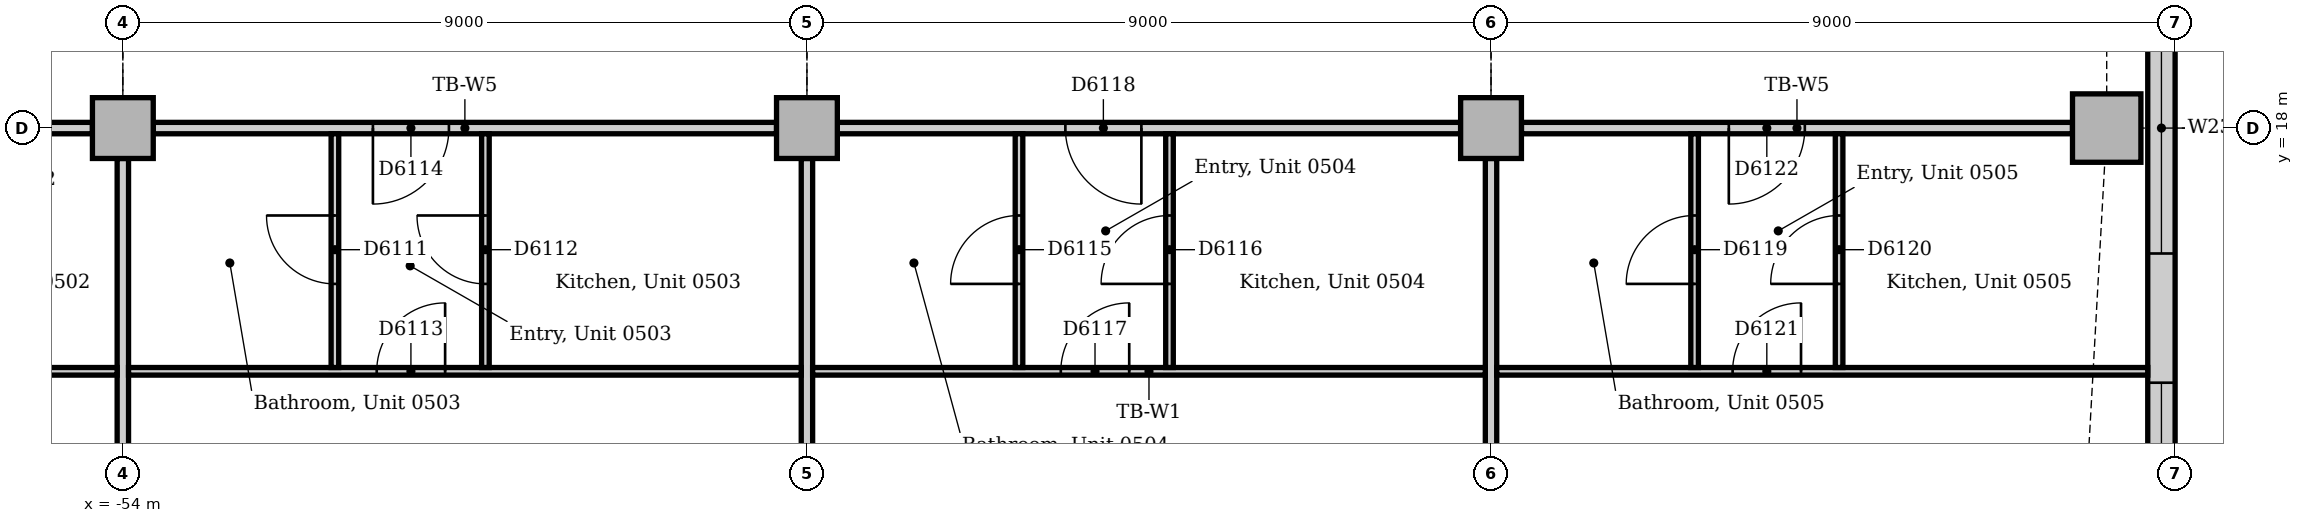
"""IFC4 building model, lengths in metres.
Left out: names, types, materials, properties, quantities, classifications, styles, units other than length and angle.
Written with IfcOpenShell. Run it as: python <this file> out.ifc"""

import sys

from ifc_helpers import new_model, si_unit, direction, frame, frame_2d, origin, origin_2d, place, context, subcontext, project, spatial, rectangle, extrude, element, fill, save


model = new_model("IFC4")
c1 = context("Model", 3, precision=1e-05, world=origin(), true_north=direction((0.0, 1.0)))
c2 = subcontext(c1, "Body", "Model", "MODEL_VIEW")
j1 = project(units=[si_unit("LENGTHUNIT", "METRE"), si_unit("PLANEANGLEUNIT", "RADIAN")], contexts=[c1])
p1 = place(None, origin())
s1 = spatial("IfcSite", under=j1, at=p1, CompositionType="ELEMENT")
p2 = place(p1, origin())
s2 = spatial("IfcBuilding", under=s1, at=p2, CompositionType="ELEMENT")
p3 = place(p2, frame((0.0, 0.0, 26.0)))
s3 = spatial("IfcBuildingStorey", under=s2, at=p3, CompositionType="ELEMENT", Elevation=26.0)
p4 = place(p3, frame((-27.9, 18.0, 0.0), z_axis=(0.0, 0.0, 1.0), x_axis=(1.0, 0.0, 0.0)))
e1 = element("IfcColumn", 1, at=p4, inside=s3, PredefinedType="COLUMN", context=c2, shape_type="SweptSolid", body=[
    extrude(rectangle(XDim=0.9, YDim=0.9, at=origin_2d()), origin(), (0.0, 0.0, 1.0), 3.85),
])
for number, where, z_axis, x_axis in (
    (2, (-54.0, 18.0, 0.0), (0.0, 0.0, 1.0), (1.0, 0.0, 0.0)),
    (3, (-45.0, 18.0, 0.0), (0.0, 0.0, 1.0), (1.0, 0.0, 0.0)),
    (4, (-36.0, 18.0, 0.0), (0.0, 0.0, 1.0), (1.0, 0.0, 0.0)),
):
    element("IfcColumn", number, at=place(p3, frame(where, z_axis=z_axis, x_axis=x_axis)), inside=s3, PredefinedType="COLUMN", context=c2, shape_type="SweptSolid", body=[
        extrude(rectangle(XDim=0.8, YDim=0.8, at=origin_2d()), origin(), (0.0, 0.0, 1.0), 3.85),
    ])
p5 = place(p3, frame((-27.18, 8.743, 0.0), z_axis=(0.0, 0.0, 1.0), x_axis=(0.0, 1.0, 0.0)))
e5 = element("IfcWall", 5, at=p5, inside=s3, PredefinedType="STANDARD", context=c2, shape_type="SweptSolid", body=[
    extrude(rectangle(XDim=12.257, YDim=0.36, at=frame_2d((6.129, 0.0))), origin(), (0.0, 0.0, 1.0), 3.85),
])
p6 = place(p5, frame((2.607, 0.0, 0.9)))
e6 = element("IfcOpeningElement", 6, at=p6, cuts=e5, PredefinedType="OPENING", context=c2, shape_type="SweptSolid", body=[
    extrude(rectangle(XDim=3.3, YDim=1.6, at=frame_2d((1.65, 0.8))), frame((0.0, 0.19, 0.0), z_axis=(0.0, -1.0, 0.0), x_axis=(1.0, 0.0, 0.0)), (0.0, 0.0, 1.0), 0.38),
])
p7 = place(p5, frame((7.607, 0.0, 0.9)))
e7 = element("IfcOpeningElement", 7, at=p7, cuts=e5, PredefinedType="OPENING", context=c2, shape_type="SweptSolid", body=[
    extrude(rectangle(XDim=3.3, YDim=1.6, at=frame_2d((1.65, 0.8))), frame((0.0, 0.19, 0.0), z_axis=(0.0, -1.0, 0.0), x_axis=(1.0, 0.0, 0.0)), (0.0, 0.0, 1.0), 0.38),
])
p8 = place(p3, frame((-35.6, 18.0, 0.0), z_axis=(0.0, 0.0, 1.0), x_axis=(1.0, 0.0, 0.0)))
e8 = element("IfcWall", 8, at=p8, inside=s3, PredefinedType="PARTITIONING", context=c2, shape_type="SweptSolid", body=[
    extrude(rectangle(XDim=7.25, YDim=0.15, at=frame_2d((3.625, 0.0))), origin(), (0.0, 0.0, 1.0), 3.15),
])
p9 = place(p8, frame((2.728, 0.0, 0.0)))
e9 = element("IfcOpeningElement", 9, at=p9, cuts=e8, PredefinedType="OPENING", context=c2, shape_type="SweptSolid", body=[
    extrude(rectangle(XDim=1.0, YDim=2.1, at=frame_2d((0.5, 1.05))), frame((0.0, 0.085, 0.0), z_axis=(0.0, -1.0, 0.0), x_axis=(1.0, 0.0, 0.0)), (0.0, 0.0, 1.0), 0.17),
])
p10 = place(p3, frame((-44.6, 18.0, 0.0), z_axis=(0.0, 0.0, 1.0), x_axis=(1.0, 0.0, 0.0)))
e10 = element("IfcWall", 10, at=p10, inside=s3, PredefinedType="PARTITIONING", context=c2, shape_type="SweptSolid", body=[
    extrude(rectangle(XDim=8.2, YDim=0.15, at=frame_2d((4.1, 0.0))), origin(), (0.0, 0.0, 1.0), 3.15),
])
p11 = place(p10, frame((3.0, 0.0, 0.0)))
e11 = element("IfcOpeningElement", 11, at=p11, cuts=e10, PredefinedType="OPENING", context=c2, shape_type="SweptSolid", body=[
    extrude(rectangle(XDim=1.0, YDim=2.1, at=frame_2d((0.5, 1.05))), frame((0.0, 0.085, 0.0), z_axis=(0.0, -1.0, 0.0), x_axis=(1.0, 0.0, 0.0)), (0.0, 0.0, 1.0), 0.17),
])
p12 = place(p3, frame((-53.6, 18.0, 0.0), z_axis=(0.0, 0.0, 1.0), x_axis=(1.0, 0.0, 0.0)))
e12 = element("IfcWall", 12, at=p12, inside=s3, PredefinedType="PARTITIONING", context=c2, shape_type="SweptSolid", body=[
    extrude(rectangle(XDim=8.2, YDim=0.15, at=frame_2d((4.1, 0.0))), origin(), (0.0, 0.0, 1.0), 3.15),
])
p13 = place(p12, frame((2.89, 0.0, 0.0)))
e13 = element("IfcOpeningElement", 13, at=p13, cuts=e12, PredefinedType="OPENING", context=c2, shape_type="SweptSolid", body=[
    extrude(rectangle(XDim=1.0, YDim=2.1, at=frame_2d((0.5, 1.05))), frame((0.0, 0.085, 0.0), z_axis=(0.0, -1.0, 0.0), x_axis=(1.0, 0.0, 0.0)), (0.0, 0.0, 1.0), 0.17),
])
p14 = place(p3, frame((-62.6, 18.0, 0.0), z_axis=(0.0, 0.0, 1.0), x_axis=(1.0, 0.0, 0.0)))
e14 = element("IfcWall", 14, at=p14, inside=s3, PredefinedType="PARTITIONING", context=c2, shape_type="SweptSolid", body=[
    extrude(rectangle(XDim=8.2, YDim=0.15, at=frame_2d((4.1, 0.0))), origin(), (0.0, 0.0, 1.0), 3.15),
])
p15 = place(p14, frame((0.4, 0.0, 0.0)))
e15 = element("IfcOpeningElement", 15, at=p15, cuts=e14, PredefinedType="OPENING", context=c2, shape_type="SweptSolid", body=[
    extrude(rectangle(XDim=0.9, YDim=2.1, at=frame_2d((0.45, 1.05))), frame((0.0, 0.085, 0.0), z_axis=(0.0, -1.0, 0.0), x_axis=(1.0, 0.0, 0.0)), (0.0, 0.0, 1.0), 0.17),
])
p16 = place(p14, frame((4.02, 0.0, 0.0)))
e16 = element("IfcOpeningElement", 16, at=p16, cuts=e14, PredefinedType="OPENING", context=c2, shape_type="SweptSolid", body=[
    extrude(rectangle(XDim=1.0, YDim=2.1, at=frame_2d((0.5, 1.05))), frame((0.0, 0.085, 0.0), z_axis=(0.0, -1.0, 0.0), x_axis=(1.0, 0.0, 0.0)), (0.0, 0.0, 1.0), 0.17),
])
for number, where, z_axis, x_axis in (
    (17, (-54.0, 9.4, 0.0), (0.0, 0.0, 1.0), (0.0, 1.0, 0.0)),
    (18, (-45.0, 9.4, 0.0), (0.0, 0.0, 1.0), (0.0, 1.0, 0.0)),
    (19, (-36.0, 9.4, 0.0), (0.0, 0.0, 1.0), (0.0, 1.0, 0.0)),
):
    element("IfcWall", number, at=place(p3, frame(where, z_axis=z_axis, x_axis=x_axis)), inside=s3, PredefinedType="PARTITIONING", context=c2, shape_type="SweptSolid", body=[
        extrude(rectangle(XDim=8.2, YDim=0.15, at=frame_2d((4.1, 0.0))), origin(), (0.0, 0.0, 1.0), 3.158),
    ])
p17 = place(p3, frame((-61.05, 14.8, 0.0), z_axis=(0.0, 0.0, 1.0), x_axis=(1.0, 0.0, 0.0)))
e20 = element("IfcWall", 20, at=p17, inside=s3, PredefinedType="PARTITIONING", context=c2, shape_type="SweptSolid", body=[
    extrude(rectangle(XDim=6.975, YDim=0.1, at=frame_2d((3.487, 0.0))), origin(), (0.0, 0.0, 1.0), 3.85),
])
p18 = place(p17, frame((2.52, 0.0, 0.0)))
e21 = element("IfcOpeningElement", 21, at=p18, cuts=e20, PredefinedType="OPENING", context=c2, shape_type="SweptSolid", body=[
    extrude(rectangle(XDim=0.9, YDim=2.1, at=frame_2d((0.45, 1.05))), frame((0.0, 0.06, 0.0), z_axis=(0.0, -1.0, 0.0), x_axis=(1.0, 0.0, 0.0)), (0.0, 0.0, 1.0), 0.12),
])
p19 = place(p3, frame((-53.925, 14.8, 0.0), z_axis=(0.0, 0.0, 1.0), x_axis=(1.0, 0.0, 0.0)))
e22 = element("IfcWall", 22, at=p19, inside=s3, PredefinedType="PARTITIONING", context=c2, shape_type="SweptSolid", body=[
    extrude(rectangle(XDim=8.85, YDim=0.1, at=frame_2d((4.425, 0.0))), origin(), (0.0, 0.0, 1.0), 3.85),
])
p20 = place(p19, frame((3.265, 0.0, 0.0)))
e23 = element("IfcOpeningElement", 23, at=p20, cuts=e22, PredefinedType="OPENING", context=c2, shape_type="SweptSolid", body=[
    extrude(rectangle(XDim=0.9, YDim=2.1, at=frame_2d((0.45, 1.05))), frame((0.0, 0.06, 0.0), z_axis=(0.0, -1.0, 0.0), x_axis=(1.0, 0.0, 0.0)), (0.0, 0.0, 1.0), 0.12),
])
p21 = place(p3, frame((-44.925, 14.8, 0.0), z_axis=(0.0, 0.0, 1.0), x_axis=(1.0, 0.0, 0.0)))
e24 = element("IfcWall", 24, at=p21, inside=s3, PredefinedType="PARTITIONING", context=c2, shape_type="SweptSolid", body=[
    extrude(rectangle(XDim=8.85, YDim=0.1, at=frame_2d((4.425, 0.0))), origin(), (0.0, 0.0, 1.0), 3.85),
])
p22 = place(p21, frame((3.265, 0.0, 0.0)))
e25 = element("IfcOpeningElement", 25, at=p22, cuts=e24, PredefinedType="OPENING", context=c2, shape_type="SweptSolid", body=[
    extrude(rectangle(XDim=0.9, YDim=2.1, at=frame_2d((0.45, 1.05))), frame((0.0, 0.06, 0.0), z_axis=(0.0, -1.0, 0.0), x_axis=(1.0, 0.0, 0.0)), (0.0, 0.0, 1.0), 0.12),
])
p23 = place(p3, frame((-35.925, 14.8, 0.0), z_axis=(0.0, 0.0, 1.0), x_axis=(1.0, 0.0, 0.0)))
e26 = element("IfcWall", 26, at=p23, inside=s3, PredefinedType="PARTITIONING", context=c2, shape_type="SweptSolid", body=[
    extrude(rectangle(XDim=8.565, YDim=0.1, at=frame_2d((4.282, 0.0))), origin(), (0.0, 0.0, 1.0), 3.85),
])
p24 = place(p23, frame((3.103, 0.0, 0.0)))
e27 = element("IfcOpeningElement", 27, at=p24, cuts=e26, PredefinedType="OPENING", context=c2, shape_type="SweptSolid", body=[
    extrude(rectangle(XDim=0.9, YDim=2.1, at=frame_2d((0.45, 1.05))), frame((0.0, 0.06, 0.0), z_axis=(0.0, -1.0, 0.0), x_axis=(1.0, 0.0, 0.0)), (0.0, 0.0, 1.0), 0.12),
])
p25 = place(p3, frame((-51.21, 14.85, 0.0), z_axis=(0.0, 0.0, 1.0), x_axis=(0.0, 1.0, 0.0)))
e28 = element("IfcWall", 28, at=p25, inside=s3, PredefinedType="PARTITIONING", context=c2, shape_type="SweptSolid", body=[
    extrude(rectangle(XDim=3.075, YDim=0.1, at=frame_2d((1.538, 0.0))), origin(), (0.0, 0.0, 1.0), 3.85),
])
p26 = place(p25, frame((1.1, 0.0, 0.0)))
e29 = element("IfcOpeningElement", 29, at=p26, cuts=e28, PredefinedType="OPENING", context=c2, shape_type="SweptSolid", body=[
    extrude(rectangle(XDim=0.9, YDim=2.1, at=frame_2d((0.45, 1.05))), frame((0.0, 0.06, 0.0), z_axis=(0.0, -1.0, 0.0), x_axis=(1.0, 0.0, 0.0)), (0.0, 0.0, 1.0), 0.12),
])
p27 = place(p3, frame((-49.23, 14.85, 0.0), z_axis=(0.0, 0.0, 1.0), x_axis=(0.0, 1.0, 0.0)))
e30 = element("IfcWall", 30, at=p27, inside=s3, PredefinedType="PARTITIONING", context=c2, shape_type="SweptSolid", body=[
    extrude(rectangle(XDim=3.075, YDim=0.1, at=frame_2d((1.538, 0.0))), origin(), (0.0, 0.0, 1.0), 3.85),
])
p28 = place(p27, frame((1.1, 0.0, 0.0)))
e31 = element("IfcOpeningElement", 31, at=p28, cuts=e30, PredefinedType="OPENING", context=c2, shape_type="SweptSolid", body=[
    extrude(rectangle(XDim=0.9, YDim=2.1, at=frame_2d((0.45, 1.05))), frame((0.0, 0.06, 0.0), z_axis=(0.0, -1.0, 0.0), x_axis=(1.0, 0.0, 0.0)), (0.0, 0.0, 1.0), 0.12),
])
p29 = place(p3, frame((-42.21, 14.85, 0.0), z_axis=(0.0, 0.0, 1.0), x_axis=(0.0, 1.0, 0.0)))
e32 = element("IfcWall", 32, at=p29, inside=s3, PredefinedType="PARTITIONING", context=c2, shape_type="SweptSolid", body=[
    extrude(rectangle(XDim=3.075, YDim=0.1, at=frame_2d((1.538, 0.0))), origin(), (0.0, 0.0, 1.0), 3.85),
])
p30 = place(p29, frame((1.1, 0.0, 0.0)))
e33 = element("IfcOpeningElement", 33, at=p30, cuts=e32, PredefinedType="OPENING", context=c2, shape_type="SweptSolid", body=[
    extrude(rectangle(XDim=0.9, YDim=2.1, at=frame_2d((0.45, 1.05))), frame((0.0, 0.06, 0.0), z_axis=(0.0, -1.0, 0.0), x_axis=(1.0, 0.0, 0.0)), (0.0, 0.0, 1.0), 0.12),
])
p31 = place(p3, frame((-40.23, 14.85, 0.0), z_axis=(0.0, 0.0, 1.0), x_axis=(0.0, 1.0, 0.0)))
e34 = element("IfcWall", 34, at=p31, inside=s3, PredefinedType="PARTITIONING", context=c2, shape_type="SweptSolid", body=[
    extrude(rectangle(XDim=3.075, YDim=0.1, at=frame_2d((1.538, 0.0))), origin(), (0.0, 0.0, 1.0), 3.85),
])
p32 = place(p31, frame((1.1, 0.0, 0.0)))
e35 = element("IfcOpeningElement", 35, at=p32, cuts=e34, PredefinedType="OPENING", context=c2, shape_type="SweptSolid", body=[
    extrude(rectangle(XDim=0.9, YDim=2.1, at=frame_2d((0.45, 1.05))), frame((0.0, 0.06, 0.0), z_axis=(0.0, -1.0, 0.0), x_axis=(1.0, 0.0, 0.0)), (0.0, 0.0, 1.0), 0.12),
])
p33 = place(p3, frame((-33.322, 14.85, 0.0), z_axis=(0.0, 0.0, 1.0), x_axis=(0.0, 1.0, 0.0)))
e36 = element("IfcWall", 36, at=p33, inside=s3, PredefinedType="PARTITIONING", context=c2, shape_type="SweptSolid", body=[
    extrude(rectangle(XDim=3.075, YDim=0.1, at=frame_2d((1.538, 0.0))), origin(), (0.0, 0.0, 1.0), 3.85),
])
p34 = place(p33, frame((1.1, 0.0, 0.0)))
e37 = element("IfcOpeningElement", 37, at=p34, cuts=e36, PredefinedType="OPENING", context=c2, shape_type="SweptSolid", body=[
    extrude(rectangle(XDim=0.9, YDim=2.1, at=frame_2d((0.45, 1.05))), frame((0.0, 0.06, 0.0), z_axis=(0.0, -1.0, 0.0), x_axis=(1.0, 0.0, 0.0)), (0.0, 0.0, 1.0), 0.12),
])
p35 = place(p3, frame((-31.421, 14.85, 0.0), z_axis=(0.0, 0.0, 1.0), x_axis=(0.0, 1.0, 0.0)))
e38 = element("IfcWall", 38, at=p35, inside=s3, PredefinedType="PARTITIONING", context=c2, shape_type="SweptSolid", body=[
    extrude(rectangle(XDim=3.075, YDim=0.1, at=frame_2d((1.538, 0.0))), origin(), (0.0, 0.0, 1.0), 3.85),
])
p36 = place(p35, frame((1.1, 0.0, 0.0)))
e39 = element("IfcOpeningElement", 39, at=p36, cuts=e38, PredefinedType="OPENING", context=c2, shape_type="SweptSolid", body=[
    extrude(rectangle(XDim=0.9, YDim=2.1, at=frame_2d((0.45, 1.05))), frame((0.0, 0.06, 0.0), z_axis=(0.0, -1.0, 0.0), x_axis=(1.0, 0.0, 0.0)), (0.0, 0.0, 1.0), 0.12),
])
p37 = place(p6, origin())
e40 = element("IfcWindow", 40, at=p37, inside=s3, PartitioningType="SINGLE_PANEL", PredefinedType="WINDOW", context=c2, shape_type="SweptSolid", body=[
    extrude(rectangle(XDim=3.3, YDim=1.6, at=frame_2d((1.65, 0.8))), frame((0.0, 0.13, 0.0), z_axis=(0.0, -1.0, 0.0), x_axis=(1.0, 0.0, 0.0)), (0.0, 0.0, 1.0), 0.06),
])
fill(e6, e40)
p38 = place(p7, origin())
e41 = element("IfcWindow", 41, at=p38, inside=s3, PartitioningType="SINGLE_PANEL", PredefinedType="WINDOW", context=c2, shape_type="SweptSolid", body=[
    extrude(rectangle(XDim=3.3, YDim=1.6, at=frame_2d((1.65, 0.8))), frame((0.0, 0.13, 0.0), z_axis=(0.0, -1.0, 0.0), x_axis=(1.0, 0.0, 0.0)), (0.0, 0.0, 1.0), 0.06),
])
fill(e7, e41)
p39 = place(p26, origin())
e42 = element("IfcDoor", 42, at=p39, inside=s3, OperationType="SINGLE_SWING_RIGHT", PredefinedType="DOOR", context=c2, shape_type="SweptSolid", body=[
    extrude(rectangle(XDim=0.9, YDim=2.1, at=frame_2d((0.45, 1.05))), frame((0.0, 0.025, 0.0), z_axis=(0.0, -1.0, 0.0), x_axis=(1.0, 0.0, 0.0)), (0.0, 0.0, 1.0), 0.05),
])
fill(e29, e42)
p40 = place(p28, origin())
e43 = element("IfcDoor", 43, at=p40, inside=s3, OperationType="SINGLE_SWING_RIGHT", PredefinedType="DOOR", context=c2, shape_type="SweptSolid", body=[
    extrude(rectangle(XDim=0.9, YDim=2.1, at=frame_2d((0.45, 1.05))), frame((0.0, 0.025, 0.0), z_axis=(0.0, -1.0, 0.0), x_axis=(1.0, 0.0, 0.0)), (0.0, 0.0, 1.0), 0.05),
])
fill(e31, e43)
p41 = place(p20, origin())
e44 = element("IfcDoor", 44, at=p41, inside=s3, OperationType="SINGLE_SWING_RIGHT", PredefinedType="DOOR", context=c2, shape_type="SweptSolid", body=[
    extrude(rectangle(XDim=0.9, YDim=2.1, at=frame_2d((0.45, 1.05))), frame((0.0, 0.025, 0.0), z_axis=(0.0, -1.0, 0.0), x_axis=(1.0, 0.0, 0.0)), (0.0, 0.0, 1.0), 0.05),
])
fill(e23, e44)
p42 = place(p13, frame((1.0, 0.0, 0.0), z_axis=(0.0, 0.0, 1.0), x_axis=(-1.0, 0.0, 0.0)))
e45 = element("IfcDoor", 45, at=p42, inside=s3, OperationType="SINGLE_SWING_RIGHT", PredefinedType="DOOR", context=c2, shape_type="SweptSolid", body=[
    extrude(rectangle(XDim=1.0, YDim=2.1, at=frame_2d((0.5, 1.05))), frame((0.0, 0.025, 0.0), z_axis=(0.0, -1.0, 0.0), x_axis=(1.0, 0.0, 0.0)), (0.0, 0.0, 1.0), 0.05),
])
fill(e13, e45)
p43 = place(p30, origin())
e46 = element("IfcDoor", 46, at=p43, inside=s3, OperationType="SINGLE_SWING_LEFT", PredefinedType="DOOR", context=c2, shape_type="SweptSolid", body=[
    extrude(rectangle(XDim=0.9, YDim=2.1, at=frame_2d((0.45, 1.05))), frame((0.0, 0.025, 0.0), z_axis=(0.0, -1.0, 0.0), x_axis=(1.0, 0.0, 0.0)), (0.0, 0.0, 1.0), 0.05),
])
fill(e33, e46)
p44 = place(p32, origin())
e47 = element("IfcDoor", 47, at=p44, inside=s3, OperationType="SINGLE_SWING_LEFT", PredefinedType="DOOR", context=c2, shape_type="SweptSolid", body=[
    extrude(rectangle(XDim=0.9, YDim=2.1, at=frame_2d((0.45, 1.05))), frame((0.0, 0.025, 0.0), z_axis=(0.0, -1.0, 0.0), x_axis=(1.0, 0.0, 0.0)), (0.0, 0.0, 1.0), 0.05),
])
fill(e35, e47)
p45 = place(p22, origin())
e48 = element("IfcDoor", 48, at=p45, inside=s3, OperationType="SINGLE_SWING_RIGHT", PredefinedType="DOOR", context=c2, shape_type="SweptSolid", body=[
    extrude(rectangle(XDim=0.9, YDim=2.1, at=frame_2d((0.45, 1.05))), frame((0.0, 0.025, 0.0), z_axis=(0.0, -1.0, 0.0), x_axis=(1.0, 0.0, 0.0)), (0.0, 0.0, 1.0), 0.05),
])
fill(e25, e48)
p46 = place(p11, frame((1.0, 0.0, 0.0), z_axis=(0.0, 0.0, 1.0), x_axis=(-1.0, 0.0, 0.0)))
e49 = element("IfcDoor", 49, at=p46, inside=s3, OperationType="SINGLE_SWING_LEFT", PredefinedType="DOOR", context=c2, shape_type="SweptSolid", body=[
    extrude(rectangle(XDim=1.0, YDim=2.1, at=frame_2d((0.5, 1.05))), frame((0.0, 0.025, 0.0), z_axis=(0.0, -1.0, 0.0), x_axis=(1.0, 0.0, 0.0)), (0.0, 0.0, 1.0), 0.05),
])
fill(e11, e49)
p47 = place(p34, origin())
e50 = element("IfcDoor", 50, at=p47, inside=s3, OperationType="SINGLE_SWING_LEFT", PredefinedType="DOOR", context=c2, shape_type="SweptSolid", body=[
    extrude(rectangle(XDim=0.9, YDim=2.1, at=frame_2d((0.45, 1.05))), frame((0.0, 0.025, 0.0), z_axis=(0.0, -1.0, 0.0), x_axis=(1.0, 0.0, 0.0)), (0.0, 0.0, 1.0), 0.05),
])
fill(e37, e50)
p48 = place(p36, origin())
e51 = element("IfcDoor", 51, at=p48, inside=s3, OperationType="SINGLE_SWING_LEFT", PredefinedType="DOOR", context=c2, shape_type="SweptSolid", body=[
    extrude(rectangle(XDim=0.9, YDim=2.1, at=frame_2d((0.45, 1.05))), frame((0.0, 0.025, 0.0), z_axis=(0.0, -1.0, 0.0), x_axis=(1.0, 0.0, 0.0)), (0.0, 0.0, 1.0), 0.05),
])
fill(e39, e51)
p49 = place(p24, origin())
e52 = element("IfcDoor", 52, at=p49, inside=s3, OperationType="SINGLE_SWING_RIGHT", PredefinedType="DOOR", context=c2, shape_type="SweptSolid", body=[
    extrude(rectangle(XDim=0.9, YDim=2.1, at=frame_2d((0.45, 1.05))), frame((0.0, 0.025, 0.0), z_axis=(0.0, -1.0, 0.0), x_axis=(1.0, 0.0, 0.0)), (0.0, 0.0, 1.0), 0.05),
])
fill(e27, e52)
p50 = place(p9, frame((1.0, 0.0, 0.0), z_axis=(0.0, 0.0, 1.0), x_axis=(-1.0, 0.0, 0.0)))
e53 = element("IfcDoor", 53, at=p50, inside=s3, OperationType="SINGLE_SWING_RIGHT", PredefinedType="DOOR", context=c2, shape_type="SweptSolid", body=[
    extrude(rectangle(XDim=1.0, YDim=2.1, at=frame_2d((0.5, 1.05))), frame((0.0, 0.025, 0.0), z_axis=(0.0, -1.0, 0.0), x_axis=(1.0, 0.0, 0.0)), (0.0, 0.0, 1.0), 0.05),
])
fill(e9, e53)
save(model, sys.argv[1])
